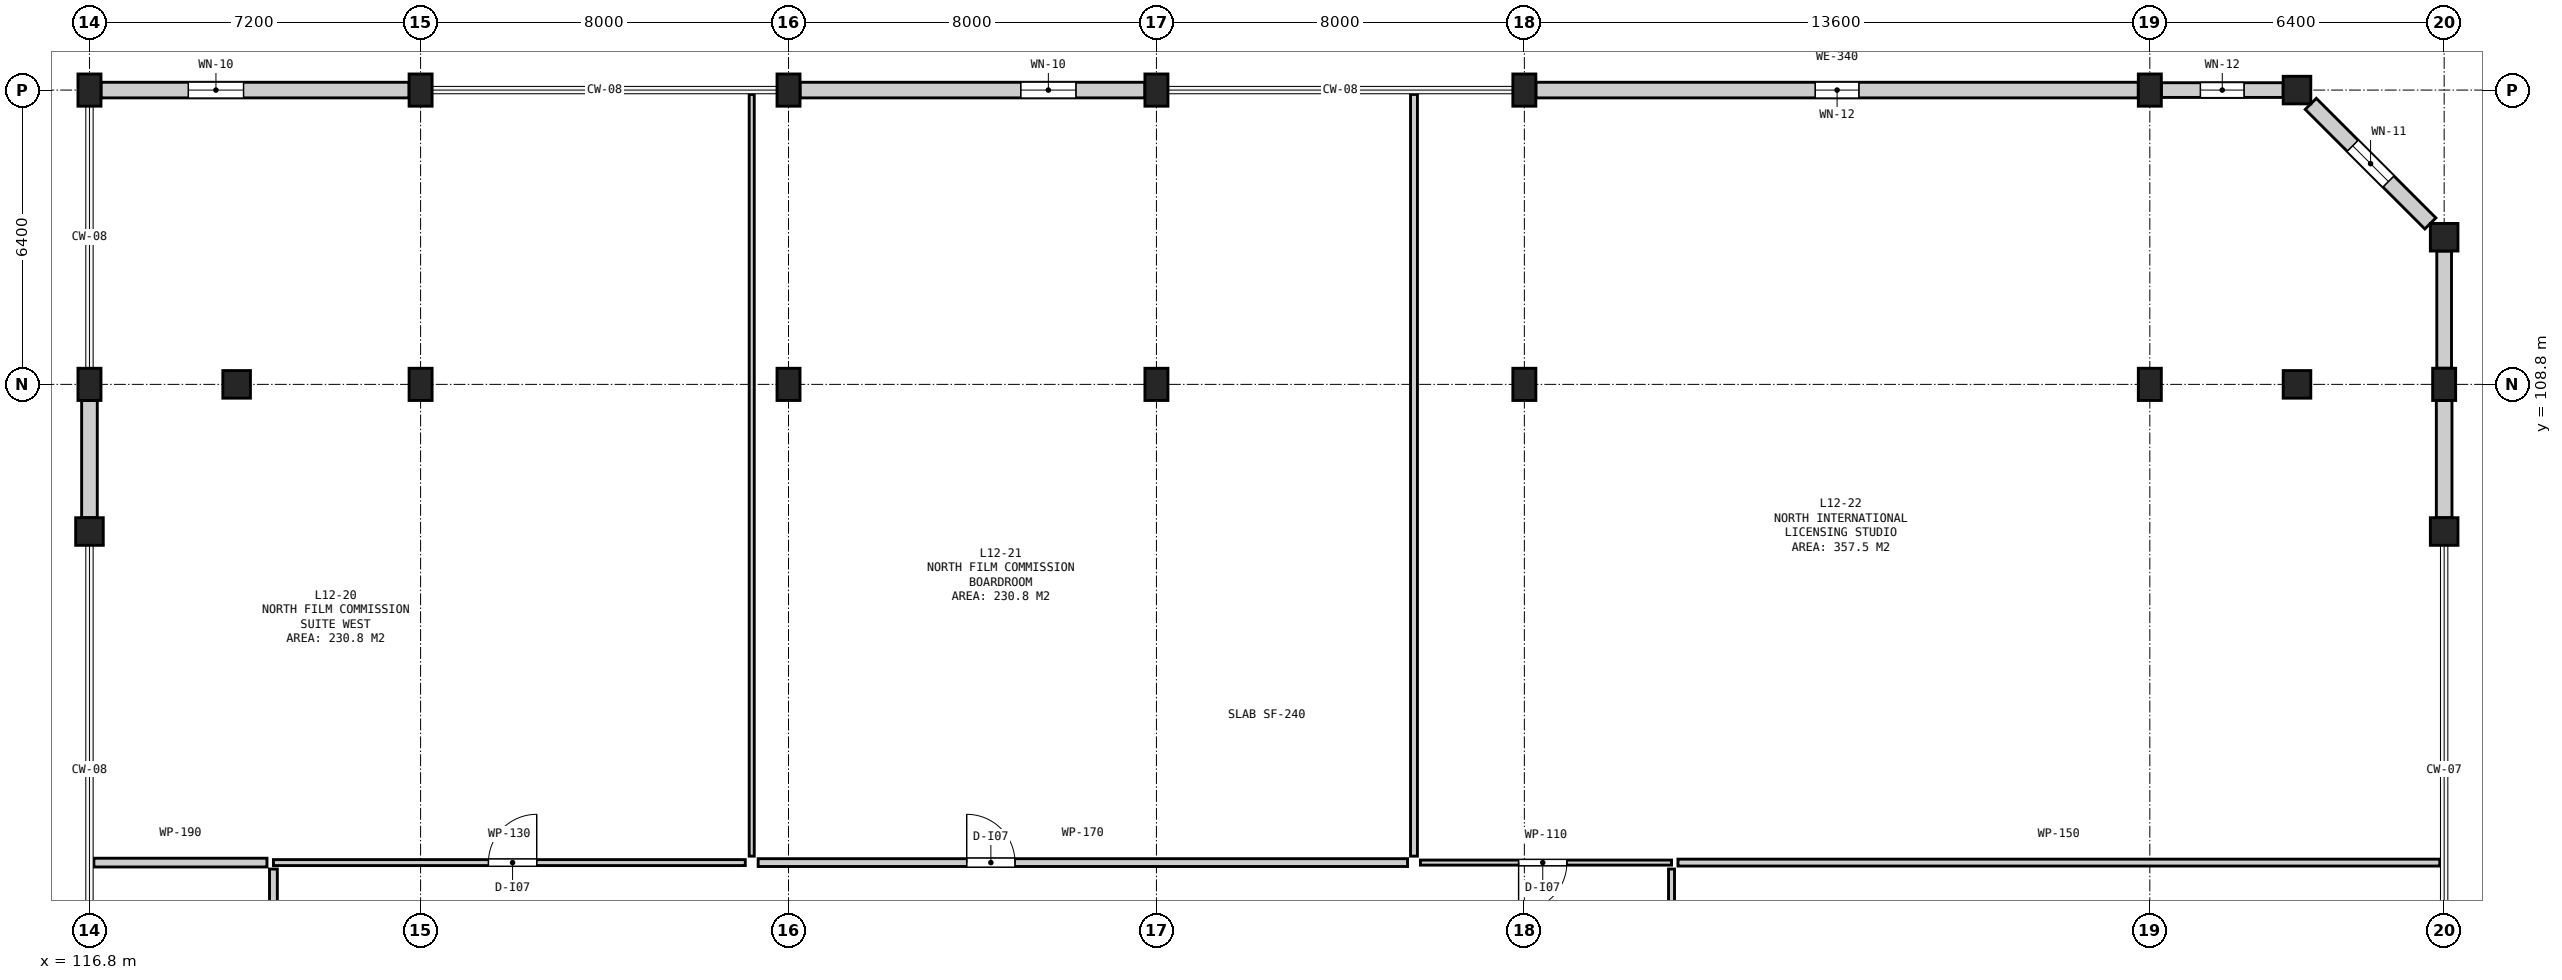
"""IFC4 building model, lengths in metres.
Left out: names, types, materials, properties, quantities, classifications, styles, units other than length and angle.
Written with IfcOpenShell. Run it as: python <this file> out.ifc"""

import sys

from ifc_helpers import new_model, si_unit, direction, frame, frame_2d, origin, origin_2d, place, context, subcontext, project, spatial, rectangle, circle, extrude, element, fill, save


model = new_model("IFC4")
c1 = context("Model", 3, precision=1e-05, world=origin(), true_north=direction((0.0, 1.0)))
c2 = subcontext(c1, "Body", "Model", "MODEL_VIEW")
j1 = project(units=[si_unit("LENGTHUNIT", "METRE"), si_unit("PLANEANGLEUNIT", "RADIAN")], contexts=[c1])
p1 = place(None, origin())
s1 = spatial("IfcSite", under=j1, at=p1, CompositionType="ELEMENT")
p2 = place(p1, origin())
s2 = spatial("IfcBuilding", under=s1, at=p2, CompositionType="ELEMENT")
p3 = place(p2, frame((0.0, 0.0, 50.9)))
s3 = spatial("IfcBuildingStorey", under=s2, at=p3, CompositionType="ELEMENT", Elevation=50.9)
p4 = place(p3, frame((116.8, 105.6, 0.0), z_axis=(0.0, 0.0, 1.0), x_axis=(1.0, 0.0, 0.0)))
e1 = element("IfcColumn", 1, at=p4, inside=s3, PredefinedType="COLUMN", context=c2, shape_type="SweptSolid", body=[
    extrude(circle(Radius=0.3, at=origin_2d()), origin(), (0.0, 0.0, 1.0), 3.9),
])
for number, where, z_axis, x_axis in (
    (2, (116.8, 108.8, 0.0), (0.0, 0.0, 1.0), (1.0, 0.0, 0.0)),
    (3, (116.8, 115.2, 0.0), (0.0, 0.0, 1.0), (1.0, 0.0, 0.0)),
):
    element("IfcColumn", number, at=place(p3, frame(where, z_axis=z_axis, x_axis=x_axis)), inside=s3, PredefinedType="COLUMN", context=c2, shape_type="SweptSolid", body=[
        extrude(rectangle(XDim=0.5, YDim=0.7, at=origin_2d()), origin(), (0.0, 0.0, 1.0), 3.9),
    ])
p5 = place(p3, frame((120.0, 108.8, 0.0), z_axis=(0.0, 0.0, 1.0), x_axis=(1.0, 0.0, 0.0)))
e4 = element("IfcColumn", 4, at=p5, inside=s3, PredefinedType="COLUMN", context=c2, shape_type="SweptSolid", body=[
    extrude(circle(Radius=0.3, at=origin_2d()), origin(), (0.0, 0.0, 1.0), 3.9),
])
for number, where, z_axis, x_axis in (
    (5, (124.0, 108.8, 0.0), (0.0, 0.0, 1.0), (1.0, 0.0, 0.0)),
    (6, (124.0, 115.2, 0.0), (0.0, 0.0, 1.0), (1.0, 0.0, 0.0)),
    (7, (132.0, 108.8, 0.0), (0.0, 0.0, 1.0), (1.0, 0.0, 0.0)),
    (8, (132.0, 115.2, 0.0), (0.0, 0.0, 1.0), (1.0, 0.0, 0.0)),
    (9, (140.0, 108.8, 0.0), (0.0, 0.0, 1.0), (1.0, 0.0, 0.0)),
    (10, (140.0, 115.2, 0.0), (0.0, 0.0, 1.0), (1.0, 0.0, 0.0)),
    (11, (148.0, 108.8, 0.0), (0.0, 0.0, 1.0), (1.0, 0.0, 0.0)),
    (12, (148.0, 115.2, 0.0), (0.0, 0.0, 1.0), (1.0, 0.0, 0.0)),
    (13, (161.6, 108.8, 0.0), (0.0, 0.0, 1.0), (1.0, 0.0, 0.0)),
    (14, (161.6, 115.2, 0.0), (0.0, 0.0, 1.0), (1.0, 0.0, 0.0)),
):
    element("IfcColumn", number, at=place(p3, frame(where, z_axis=z_axis, x_axis=x_axis)), inside=s3, PredefinedType="COLUMN", context=c2, shape_type="SweptSolid", body=[
        extrude(rectangle(XDim=0.5, YDim=0.7, at=origin_2d()), origin(), (0.0, 0.0, 1.0), 3.9),
    ])
for number, where, z_axis, x_axis in (
    (15, (164.8, 108.8, 0.0), (0.0, 0.0, 1.0), (1.0, 0.0, 0.0)),
    (16, (164.8, 115.2, 0.0), (0.0, 0.0, 1.0), (1.0, 0.0, 0.0)),
    (17, (168.0, 105.6, 0.0), (0.0, 0.0, 1.0), (1.0, 0.0, 0.0)),
):
    element("IfcColumn", number, at=place(p3, frame(where, z_axis=z_axis, x_axis=x_axis)), inside=s3, PredefinedType="COLUMN", context=c2, shape_type="SweptSolid", body=[
        extrude(circle(Radius=0.3, at=origin_2d()), origin(), (0.0, 0.0, 1.0), 3.9),
    ])
p6 = place(p3, frame((168.0, 108.8, 0.0), z_axis=(0.0, 0.0, 1.0), x_axis=(1.0, 0.0, 0.0)))
e18 = element("IfcColumn", 18, at=p6, inside=s3, PredefinedType="COLUMN", context=c2, shape_type="SweptSolid", body=[
    extrude(rectangle(XDim=0.5, YDim=0.7, at=origin_2d()), origin(), (0.0, 0.0, 1.0), 3.9),
])
p7 = place(p3, frame((168.0, 112.0, 0.0), z_axis=(0.0, 0.0, 1.0), x_axis=(1.0, 0.0, 0.0)))
e19 = element("IfcColumn", 19, at=p7, inside=s3, PredefinedType="COLUMN", context=c2, shape_type="SweptSolid", body=[
    extrude(circle(Radius=0.3, at=origin_2d()), origin(), (0.0, 0.0, 1.0), 3.9),
])
p8 = place(p3, frame((168.0, 105.9, 0.0), z_axis=(0.0, 0.0, 1.0), x_axis=(0.0, 1.0, 0.0)))
e20 = element("IfcWall", 20, at=p8, inside=s3, PredefinedType="SOLIDWALL", context=c2, shape_type="SweptSolid", body=[
    extrude(rectangle(XDim=2.55, YDim=0.34, at=frame_2d((1.275, 0.0))), origin(), (0.0, 0.0, 1.0), 2.595),
])
p9 = place(p3, frame((168.0, 109.15, 0.0), z_axis=(0.0, 0.0, 1.0), x_axis=(0.0, 1.0, 0.0)))
e21 = element("IfcWall", 21, at=p9, inside=s3, PredefinedType="SOLIDWALL", context=c2, shape_type="SweptSolid", body=[
    extrude(rectangle(XDim=2.55, YDim=0.32, at=frame_2d((1.275, 0.0))), origin(), (0.0, 0.0, 1.0), 3.06),
])
p10 = place(p3, frame((167.7, 112.3, 0.0), z_axis=(0.0, 0.0, 1.0), x_axis=(-0.707106781187, 0.707106781187, 0.0)))
e22 = element("IfcWall", 22, at=p10, inside=s3, PredefinedType="SOLIDWALL", context=c2, shape_type="SweptSolid", body=[
    extrude(rectangle(XDim=3.677, YDim=0.34, at=frame_2d((1.838, 0.0))), origin(), (0.0, 0.0, 1.0), 3.055),
])
p11 = place(p10, frame((1.289, 0.0, 0.9)))
e23 = element("IfcOpeningElement", 23, at=p11, cuts=e22, PredefinedType="OPENING", context=c2, shape_type="SweptSolid", body=[
    extrude(rectangle(XDim=1.1, YDim=1.55, at=frame_2d((0.55, 0.775))), frame((0.0, 0.182, 0.0), z_axis=(0.0, -1.0, 0.0), x_axis=(1.0, 0.0, 0.0)), (0.0, 0.0, 1.0), 0.364),
])
p12 = place(p3, frame((164.5, 115.2, 0.0), z_axis=(0.0, 0.0, 1.0), x_axis=(-1.0, 0.0, 0.0)))
e24 = element("IfcWall", 24, at=p12, inside=s3, PredefinedType="SOLIDWALL", context=c2, shape_type="SweptSolid", body=[
    extrude(rectangle(XDim=2.65, YDim=0.32, at=frame_2d((1.325, 0.0))), origin(), (0.0, 0.0, 1.0), 3.06),
])
p13 = place(p12, frame((0.85, 0.0, 0.9)))
e25 = element("IfcOpeningElement", 25, at=p13, cuts=e24, PredefinedType="OPENING", context=c2, shape_type="SweptSolid", body=[
    extrude(rectangle(XDim=0.95, YDim=1.45, at=frame_2d((0.475, 0.725))), frame((0.0, 0.172, 0.0), z_axis=(0.0, -1.0, 0.0), x_axis=(1.0, 0.0, 0.0)), (0.0, 0.0, 1.0), 0.344),
])
p14 = place(p3, frame((161.35, 115.2, 0.0), z_axis=(0.0, 0.0, 1.0), x_axis=(-1.0, 0.0, 0.0)))
e26 = element("IfcWall", 26, at=p14, inside=s3, PredefinedType="SOLIDWALL", context=c2, shape_type="SweptSolid", body=[
    extrude(rectangle(XDim=13.1, YDim=0.34, at=frame_2d((6.55, 0.0))), origin(), (0.0, 0.0, 1.0), 2.645),
])
p15 = place(p14, frame((6.075, 0.0, 0.8)))
e27 = element("IfcOpeningElement", 27, at=p15, cuts=e26, PredefinedType="OPENING", context=c2, shape_type="SweptSolid", body=[
    extrude(rectangle(XDim=0.95, YDim=1.45, at=frame_2d((0.475, 0.725))), frame((0.0, 0.182, 0.0), z_axis=(0.0, -1.0, 0.0), x_axis=(1.0, 0.0, 0.0)), (0.0, 0.0, 1.0), 0.364),
])
p16 = place(p3, frame((139.75, 115.2, 0.0), z_axis=(0.0, 0.0, 1.0), x_axis=(-1.0, 0.0, 0.0)))
e28 = element("IfcWall", 28, at=p16, inside=s3, PredefinedType="SOLIDWALL", context=c2, shape_type="SweptSolid", body=[
    extrude(rectangle(XDim=7.5, YDim=0.34, at=frame_2d((3.75, 0.0))), origin(), (0.0, 0.0, 1.0), 3.045),
])
p17 = place(p16, frame((1.5, 0.0, 0.9)))
e29 = element("IfcOpeningElement", 29, at=p17, cuts=e28, PredefinedType="OPENING", context=c2, shape_type="SweptSolid", body=[
    extrude(rectangle(XDim=1.2, YDim=1.7, at=frame_2d((0.6, 0.85))), frame((0.0, 0.182, 0.0), z_axis=(0.0, -1.0, 0.0), x_axis=(1.0, 0.0, 0.0)), (0.0, 0.0, 1.0), 0.364),
])
p18 = place(p3, frame((123.75, 115.2, 0.0), z_axis=(0.0, 0.0, 1.0), x_axis=(-1.0, 0.0, 0.0)))
e30 = element("IfcWall", 30, at=p18, inside=s3, PredefinedType="SOLIDWALL", context=c2, shape_type="SweptSolid", body=[
    extrude(rectangle(XDim=6.7, YDim=0.34, at=frame_2d((3.35, 0.0))), origin(), (0.0, 0.0, 1.0), 3.06),
])
p19 = place(p18, frame((3.6, 0.0, 0.9)))
e31 = element("IfcOpeningElement", 31, at=p19, cuts=e30, PredefinedType="OPENING", context=c2, shape_type="SweptSolid", body=[
    extrude(rectangle(XDim=1.2, YDim=1.7, at=frame_2d((0.6, 0.85))), frame((0.0, 0.182, 0.0), z_axis=(0.0, -1.0, 0.0), x_axis=(1.0, 0.0, 0.0)), (0.0, 0.0, 1.0), 0.364),
])
p20 = place(p3, frame((116.8, 108.45, 0.0), z_axis=(0.0, 0.0, 1.0), x_axis=(0.0, -1.0, 0.0)))
e32 = element("IfcWall", 32, at=p20, inside=s3, PredefinedType="SOLIDWALL", context=c2, shape_type="SweptSolid", body=[
    extrude(rectangle(XDim=2.55, YDim=0.34, at=frame_2d((1.275, 0.0))), origin(), (0.0, 0.0, 1.0), 2.595),
])
p21 = place(p3, frame((151.34, 98.4, 0.0), z_axis=(0.0, 0.0, 1.0), x_axis=(1.0, 0.0, 0.0)))
e33 = element("IfcWall", 33, at=p21, inside=s3, PredefinedType="PARTITIONING", context=c2, shape_type="SweptSolid", body=[
    extrude(rectangle(XDim=16.565, YDim=0.15, at=frame_2d((8.282, 0.0))), origin(), (0.0, 0.0, 1.0), 3.62),
])
p22 = place(p3, frame((151.2, 86.54, 0.0), z_axis=(0.0, 0.0, 1.0), x_axis=(0.0, 1.0, 0.0)))
e34 = element("IfcWall", 34, at=p22, inside=s3, PredefinedType="PARTITIONING", context=c2, shape_type="SweptSolid", body=[
    extrude(rectangle(XDim=11.72, YDim=0.13, at=frame_2d((5.86, 0.0))), origin(), (0.0, 0.0, 1.0), 3.62),
])
p23 = place(p22, frame((5.135, 0.0, 0.0)))
e35 = element("IfcOpeningElement", 35, at=p23, cuts=e34, PredefinedType="OPENING", context=c2, shape_type="SweptSolid", body=[
    extrude(rectangle(XDim=1.05, YDim=2.15, at=frame_2d((0.525, 1.075))), frame((0.0, 0.077, 0.0), z_axis=(0.0, -1.0, 0.0), x_axis=(1.0, 0.0, 0.0)), (0.0, 0.0, 1.0), 0.154),
])
p24 = place(p3, frame((116.895, 98.4, 0.0), z_axis=(0.0, 0.0, 1.0), x_axis=(1.0, 0.0, 0.0)))
e36 = element("IfcWall", 36, at=p24, inside=s3, PredefinedType="PARTITIONING", context=c2, shape_type="SweptSolid", body=[
    extrude(rectangle(XDim=3.765, YDim=0.19, at=frame_2d((1.882, 0.0))), origin(), (0.0, 0.0, 1.0), 3.62),
])
p25 = place(p3, frame((120.8, 76.14, 0.0), z_axis=(0.0, 0.0, 1.0), x_axis=(0.0, 1.0, 0.0)))
e37 = element("IfcWall", 37, at=p25, inside=s3, PredefinedType="PARTITIONING", context=c2, shape_type="SweptSolid", body=[
    extrude(rectangle(XDim=22.12, YDim=0.17, at=frame_2d((11.06, 0.0))), origin(), (0.0, 0.0, 1.0), 3.62),
])
p26 = place(p25, frame((6.535, 0.0, 0.0)))
e38 = element("IfcOpeningElement", 38, at=p26, cuts=e37, PredefinedType="OPENING", context=c2, shape_type="SweptSolid", body=[
    extrude(rectangle(XDim=1.05, YDim=2.15, at=frame_2d((0.525, 1.075))), frame((0.0, 0.097, 0.0), z_axis=(0.0, -1.0, 0.0), x_axis=(1.0, 0.0, 0.0)), (0.0, 0.0, 1.0), 0.194),
])
p27 = place(p3, frame((120.8, 98.4, 0.0), z_axis=(0.0, 0.0, 1.0), x_axis=(1.0, 0.0, 0.0)))
e39 = element("IfcWall", 39, at=p27, inside=s3, PredefinedType="PARTITIONING", context=c2, shape_type="SweptSolid", body=[
    extrude(rectangle(XDim=10.26, YDim=0.13, at=frame_2d((5.13, 0.0))), origin(), (0.0, 0.0, 1.0), 3.62),
])
p28 = place(p27, frame((4.675, 0.0, 0.0)))
e40 = element("IfcOpeningElement", 40, at=p28, cuts=e39, PredefinedType="OPENING", context=c2, shape_type="SweptSolid", body=[
    extrude(rectangle(XDim=1.05, YDim=2.15, at=frame_2d((0.525, 1.075))), frame((0.0, 0.077, 0.0), z_axis=(0.0, -1.0, 0.0), x_axis=(1.0, 0.0, 0.0)), (0.0, 0.0, 1.0), 0.154),
])
p29 = place(p3, frame((131.2, 98.54, 0.0), z_axis=(0.0, 0.0, 1.0), x_axis=(0.0, 1.0, 0.0)))
e41 = element("IfcWall", 41, at=p29, inside=s3, PredefinedType="PARTITIONING", context=c2, shape_type="SweptSolid", body=[
    extrude(rectangle(XDim=16.565, YDim=0.11, at=frame_2d((8.282, 0.0))), origin(), (0.0, 0.0, 1.0), 3.62),
])
p30 = place(p3, frame((131.34, 98.4, 0.0), z_axis=(0.0, 0.0, 1.0), x_axis=(1.0, 0.0, 0.0)))
e42 = element("IfcWall", 42, at=p30, inside=s3, PredefinedType="PARTITIONING", context=c2, shape_type="SweptSolid", body=[
    extrude(rectangle(XDim=14.12, YDim=0.17, at=frame_2d((7.06, 0.0))), origin(), (0.0, 0.0, 1.0), 3.62),
])
p31 = place(p30, frame((4.535, 0.0, 0.0)))
e43 = element("IfcOpeningElement", 43, at=p31, cuts=e42, PredefinedType="OPENING", context=c2, shape_type="SweptSolid", body=[
    extrude(rectangle(XDim=1.05, YDim=2.15, at=frame_2d((0.525, 1.075))), frame((0.0, 0.097, 0.0), z_axis=(0.0, -1.0, 0.0), x_axis=(1.0, 0.0, 0.0)), (0.0, 0.0, 1.0), 0.194),
])
p32 = place(p3, frame((145.6, 98.54, 0.0), z_axis=(0.0, 0.0, 1.0), x_axis=(0.0, 1.0, 0.0)))
e44 = element("IfcWall", 44, at=p32, inside=s3, PredefinedType="PARTITIONING", context=c2, shape_type="SweptSolid", body=[
    extrude(rectangle(XDim=16.565, YDim=0.15, at=frame_2d((8.282, 0.0))), origin(), (0.0, 0.0, 1.0), 3.62),
])
p33 = place(p3, frame((145.74, 98.4, 0.0), z_axis=(0.0, 0.0, 1.0), x_axis=(1.0, 0.0, 0.0)))
e45 = element("IfcWall", 45, at=p33, inside=s3, PredefinedType="PARTITIONING", context=c2, shape_type="SweptSolid", body=[
    extrude(rectangle(XDim=5.46, YDim=0.11, at=frame_2d((2.73, 0.0))), origin(), (0.0, 0.0, 1.0), 3.62),
])
p34 = place(p33, frame((2.135, 0.0, 0.0)))
e46 = element("IfcOpeningElement", 46, at=p34, cuts=e45, PredefinedType="OPENING", context=c2, shape_type="SweptSolid", body=[
    extrude(rectangle(XDim=1.05, YDim=2.15, at=frame_2d((0.525, 1.075))), frame((0.0, 0.067, 0.0), z_axis=(0.0, -1.0, 0.0), x_axis=(1.0, 0.0, 0.0)), (0.0, 0.0, 1.0), 0.134),
])
p35 = place(p11, origin())
e47 = element("IfcWindow", 47, at=p35, inside=s3, PartitioningType="SINGLE_PANEL", PredefinedType="WINDOW", context=c2, shape_type="SweptSolid", body=[
    extrude(rectangle(XDim=1.1, YDim=1.55, at=frame_2d((0.55, 0.775))), frame((0.0, 0.03, 0.0), z_axis=(0.0, -1.0, 0.0), x_axis=(1.0, 0.0, 0.0)), (0.0, 0.0, 1.0), 0.06),
])
fill(e23, e47)
p36 = place(p13, origin())
e48 = element("IfcWindow", 48, at=p36, inside=s3, PartitioningType="SINGLE_PANEL", PredefinedType="WINDOW", context=c2, shape_type="SweptSolid", body=[
    extrude(rectangle(XDim=0.95, YDim=1.45, at=frame_2d((0.475, 0.725))), frame((0.0, 0.03, 0.0), z_axis=(0.0, -1.0, 0.0), x_axis=(1.0, 0.0, 0.0)), (0.0, 0.0, 1.0), 0.06),
])
fill(e25, e48)
p37 = place(p15, origin())
e49 = element("IfcWindow", 49, at=p37, inside=s3, PartitioningType="SINGLE_PANEL", PredefinedType="WINDOW", context=c2, shape_type="SweptSolid", body=[
    extrude(rectangle(XDim=0.95, YDim=1.45, at=frame_2d((0.475, 0.725))), frame((0.0, 0.03, 0.0), z_axis=(0.0, -1.0, 0.0), x_axis=(1.0, 0.0, 0.0)), (0.0, 0.0, 1.0), 0.06),
])
fill(e27, e49)
p38 = place(p17, origin())
e50 = element("IfcWindow", 50, at=p38, inside=s3, PartitioningType="SINGLE_PANEL", PredefinedType="WINDOW", context=c2, shape_type="SweptSolid", body=[
    extrude(rectangle(XDim=1.2, YDim=1.7, at=frame_2d((0.6, 0.85))), frame((0.0, 0.03, 0.0), z_axis=(0.0, -1.0, 0.0), x_axis=(1.0, 0.0, 0.0)), (0.0, 0.0, 1.0), 0.06),
])
fill(e29, e50)
p39 = place(p19, origin())
e51 = element("IfcWindow", 51, at=p39, inside=s3, PartitioningType="SINGLE_PANEL", PredefinedType="WINDOW", context=c2, shape_type="SweptSolid", body=[
    extrude(rectangle(XDim=1.2, YDim=1.7, at=frame_2d((0.6, 0.85))), frame((0.0, 0.03, 0.0), z_axis=(0.0, -1.0, 0.0), x_axis=(1.0, 0.0, 0.0)), (0.0, 0.0, 1.0), 0.06),
])
fill(e31, e51)
p40 = place(p28, origin())
e52 = element("IfcDoor", 52, at=p40, inside=s3, OperationType="SINGLE_SWING_RIGHT", PredefinedType="DOOR", context=c2, shape_type="SweptSolid", body=[
    extrude(rectangle(XDim=1.05, YDim=2.15, at=frame_2d((0.525, 1.075))), frame((0.0, 0.025, 0.0), z_axis=(0.0, -1.0, 0.0), x_axis=(1.0, 0.0, 0.0)), (0.0, 0.0, 1.0), 0.05),
])
fill(e40, e52)
p41 = place(p31, origin())
e53 = element("IfcDoor", 53, at=p41, inside=s3, OperationType="SINGLE_SWING_LEFT", PredefinedType="DOOR", context=c2, shape_type="SweptSolid", body=[
    extrude(rectangle(XDim=1.05, YDim=2.15, at=frame_2d((0.525, 1.075))), frame((0.0, 0.025, 0.0), z_axis=(0.0, -1.0, 0.0), x_axis=(1.0, 0.0, 0.0)), (0.0, 0.0, 1.0), 0.05),
])
fill(e43, e53)
p42 = place(p34, frame((1.05, 0.0, 0.0), z_axis=(0.0, 0.0, 1.0), x_axis=(-1.0, 0.0, 0.0)))
e54 = element("IfcDoor", 54, at=p42, inside=s3, OperationType="SINGLE_SWING_RIGHT", PredefinedType="DOOR", context=c2, shape_type="SweptSolid", body=[
    extrude(rectangle(XDim=1.05, YDim=2.15, at=frame_2d((0.525, 1.075))), frame((0.0, 0.025, 0.0), z_axis=(0.0, -1.0, 0.0), x_axis=(1.0, 0.0, 0.0)), (0.0, 0.0, 1.0), 0.05),
])
fill(e46, e54)
save(model, sys.argv[1])
